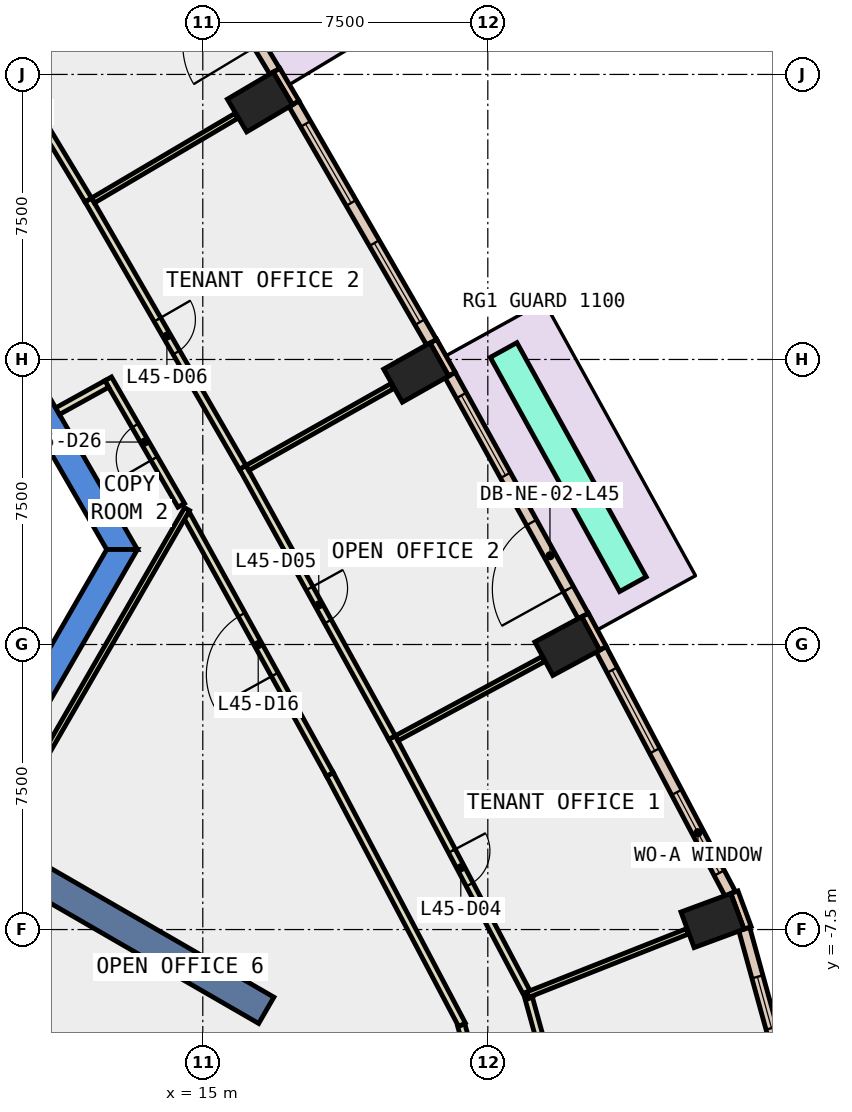
"""IFC4 building model, lengths in metres.
Left out: names, types, materials, properties, quantities, classifications, styles, units other than length and angle.
Written with IfcOpenShell. Run it as: python <this file> out.ifc"""

import sys

from ifc_helpers import new_model, si_unit, direction, frame, frame_2d, origin, origin_2d, place, context, subcontext, project, spatial, polyline, rectangle, outline, extrude, element, fill, save


model = new_model("IFC4")
c1 = context("Model", 3, precision=1e-05, world=origin(), true_north=direction((0.0, 1.0)))
c2 = subcontext(c1, "Body", "Model", "MODEL_VIEW")
j1 = project(units=[si_unit("LENGTHUNIT", "METRE"), si_unit("PLANEANGLEUNIT", "RADIAN")], contexts=[c1])
p1 = place(None, origin())
s1 = spatial("IfcSite", under=j1, at=p1, CompositionType="ELEMENT")
p2 = place(p1, origin())
s2 = spatial("IfcBuilding", under=s1, at=p2, CompositionType="ELEMENT")
p3 = place(p2, frame((0.0, 0.0, 202.4)))
s3 = spatial("IfcBuildingStorey", under=s2, at=p3, CompositionType="ELEMENT", Elevation=202.4)
for number, where, z_axis, x_axis in (
    (1, (28.412, -7.264, -0.4), (0.0, 0.0, 1.0), (-0.347, 0.938, 0.0)),
    (2, (24.591, -0.042, -0.4), (0.0, 0.0, 1.0), (-0.474, 0.88, 0.0)),
    (3, (20.615, 7.155, -0.4), (0.0, 0.0, 1.0), (-0.491, 0.871, 0.0)),
    (4, (16.504, 14.275, -0.4), (0.0, 0.0, 1.0), (-0.509, 0.861, 0.0)),
):
    element("IfcColumn", number, at=place(p3, frame(where, z_axis=z_axis, x_axis=x_axis)), inside=s3, PredefinedType="COLUMN", context=c2, shape_type="SweptSolid", body=[
        extrude(rectangle(XDim=1.0, YDim=1.4, at=origin_2d()), origin(), (0.0, 0.0, 1.0), 4.2),
    ])
p4 = place(p3, frame((0.0, 0.0, -0.4)))
e5 = element("IfcWall", 5, at=p4, inside=s3, PredefinedType="SHEAR", context=c2, shape_type="SweptSolid", body=[
    extrude(outline(polyline([(8.084, 11.498), (7.478, 11.148), (12.471, 2.5), (13.279, 2.5), (8.084, 11.498)])), origin(), (0.0, 0.0, 1.0), 4.2),
])
p5 = place(p3, frame((0.0, 0.0, -0.4)))
e6 = element("IfcWall", 6, at=p5, inside=s3, PredefinedType="SHEAR", context=c2, shape_type="SweptSolid", body=[
    extrude(outline(polyline([(6.64, -9.0), (13.279, 2.5), (12.471, 2.5), (6.235, -8.3), (6.64, -9.0)])), origin(), (0.0, 0.0, 1.0), 4.2),
])
p6 = place(p3, frame((8.877, -5.125, -0.4), z_axis=(0.0, 0.0, 1.0), x_axis=(0.866017533419, -0.500013631625, 0.0)))
e7 = element("IfcWall", 7, at=p6, inside=s3, PredefinedType="SHEAR", context=c2, shape_type="SweptSolid", body=[
    extrude(rectangle(XDim=9.0, YDim=0.8, at=frame_2d((4.5, 0.0))), origin(), (0.0, 0.0, 1.0), 4.2),
])
p7 = place(p3, frame((29.336, -7.456, 0.0), z_axis=(0.0, 0.0, 1.0), x_axis=(-0.346892928577, 0.937904737222, 0.0)))
e8 = element("IfcWall", 8, at=p7, inside=s3, PredefinedType="STANDARD", context=c2, shape_type="SweptSolid", body=[
    extrude(rectangle(XDim=1.0, YDim=0.2, at=frame_2d((0.5, 0.0))), origin(), (0.0, 0.0, 1.0), 3.8),
])
p8 = place(p3, frame((25.532, -0.103, 0.0), z_axis=(0.0, 0.0, 1.0), x_axis=(-0.473663196434, 0.88070606694, 0.0)))
e9 = element("IfcWall", 9, at=p8, inside=s3, PredefinedType="STANDARD", context=c2, shape_type="SweptSolid", body=[
    extrude(rectangle(XDim=1.0, YDim=0.2, at=frame_2d((0.5, 0.0))), origin(), (0.0, 0.0, 1.0), 3.8),
])
p9 = place(p3, frame((21.558, 7.112, 0.0), z_axis=(0.0, 0.0, 1.0), x_axis=(-0.492033129803, 0.870576475202, 0.0)))
e10 = element("IfcWall", 10, at=p9, inside=s3, PredefinedType="STANDARD", context=c2, shape_type="SweptSolid", body=[
    extrude(rectangle(XDim=1.0, YDim=0.2, at=frame_2d((0.5, 0.0))), origin(), (0.0, 0.0, 1.0), 3.8),
])
p10 = place(p3, frame((17.447, 14.252, 0.0), z_axis=(0.0, 0.0, 1.0), x_axis=(-0.508161541526, 0.861261776531, 0.0)))
e11 = element("IfcWall", 11, at=p10, inside=s3, PredefinedType="STANDARD", context=c2, shape_type="SweptSolid", body=[
    extrude(rectangle(XDim=1.0, YDim=0.2, at=frame_2d((0.5, 0.0))), origin(), (0.0, 0.0, 1.0), 3.8),
])
p11 = place(p3, frame((30.312, -11.35, 0.0), z_axis=(0.0, 0.0, 1.0), x_axis=(-0.265534577923, 0.96410133696, 0.0)))
e12 = element("IfcWall", 12, at=p11, inside=s3, PredefinedType="STANDARD", context=c2, shape_type="SweptSolid", body=[
    extrude(rectangle(XDim=4.007, YDim=0.3, at=frame_2d((2.003, 0.0))), origin(), (0.0, 0.0, 1.0), 3.8),
])
p12 = place(p11, frame((1.303, 0.0, 0.9)))
e13 = element("IfcOpeningElement", 13, at=p12, cuts=e12, PredefinedType="OPENING", context=c2, shape_type="SweptSolid", body=[
    extrude(rectangle(XDim=1.4, YDim=2.6, at=frame_2d((0.7, 1.3))), frame((0.0, 0.16, 0.0), z_axis=(0.0, -1.0, 0.0), x_axis=(1.0, 0.0, 0.0)), (0.0, 0.0, 1.0), 0.32),
])
p13 = place(p3, frame((28.879, -6.559, 0.0), z_axis=(0.0, 0.0, 1.0), x_axis=(-0.466789249342, 0.884368586449, 0.0)))
e14 = element("IfcWall", 14, at=p13, inside=s3, PredefinedType="STANDARD", context=c2, shape_type="SweptSolid", body=[
    extrude(rectangle(XDim=7.273, YDim=0.3, at=frame_2d((3.637, 0.0))), origin(), (0.0, 0.0, 1.0), 3.8),
])
p14 = place(p13, frame((0.618, 0.0, 0.9)))
e15 = element("IfcOpeningElement", 15, at=p14, cuts=e14, PredefinedType="OPENING", context=c2, shape_type="SweptSolid", body=[
    extrude(rectangle(XDim=2.4, YDim=2.6, at=frame_2d((1.2, 1.3))), frame((0.0, 0.16, 0.0), z_axis=(0.0, -1.0, 0.0), x_axis=(1.0, 0.0, 0.0)), (0.0, 0.0, 1.0), 0.32),
])
p15 = place(p13, frame((4.255, 0.0, 0.9)))
e16 = element("IfcOpeningElement", 16, at=p15, cuts=e14, PredefinedType="OPENING", context=c2, shape_type="SweptSolid", body=[
    extrude(rectangle(XDim=2.4, YDim=2.6, at=frame_2d((1.2, 1.3))), frame((0.0, 0.16, 0.0), z_axis=(0.0, -1.0, 0.0), x_axis=(1.0, 0.0, 0.0)), (0.0, 0.0, 1.0), 0.32),
])
p16 = place(p3, frame((25.01, 0.751, 0.0), z_axis=(0.0, 0.0, 1.0), x_axis=(-0.483590905878, 0.875294142419, 0.0)))
e17 = element("IfcWall", 17, at=p16, inside=s3, PredefinedType="STANDARD", context=c2, shape_type="SweptSolid", body=[
    extrude(rectangle(XDim=7.238, YDim=0.3, at=frame_2d((3.619, 0.0))), origin(), (0.0, 0.0, 1.0), 3.8),
])
p17 = place(p16, frame((0.809, 0.0, 0.0)))
e18 = element("IfcOpeningElement", 18, at=p17, cuts=e17, PredefinedType="OPENING", context=c2, shape_type="SweptSolid", body=[
    extrude(rectangle(XDim=2.0, YDim=2.4, at=frame_2d((1.0, 1.2))), frame((0.0, 0.16, 0.0), z_axis=(0.0, -1.0, 0.0), x_axis=(1.0, 0.0, 0.0)), (0.0, 0.0, 1.0), 0.32),
])
p18 = place(p16, frame((4.228, 0.0, 0.9)))
e19 = element("IfcOpeningElement", 19, at=p18, cuts=e17, PredefinedType="OPENING", context=c2, shape_type="SweptSolid", body=[
    extrude(rectangle(XDim=2.4, YDim=2.6, at=frame_2d((1.2, 1.3))), frame((0.0, 0.16, 0.0), z_axis=(0.0, -1.0, 0.0), x_axis=(1.0, 0.0, 0.0)), (0.0, 0.0, 1.0), 0.32),
])
p19 = place(p3, frame((21.019, 7.955, 0.0), z_axis=(0.0, 0.0, 1.0), x_axis=(-0.500012402131, 0.866018243292, 0.0)))
e20 = element("IfcWall", 20, at=p19, inside=s3, PredefinedType="STANDARD", context=c2, shape_type="SweptSolid", body=[
    extrude(rectangle(XDim=7.24, YDim=0.3, at=frame_2d((3.62, 0.0))), origin(), (0.0, 0.0, 1.0), 3.8),
])
p20 = place(p19, frame((0.61, 0.0, 0.9)))
e21 = element("IfcOpeningElement", 21, at=p20, cuts=e20, PredefinedType="OPENING", context=c2, shape_type="SweptSolid", body=[
    extrude(rectangle(XDim=2.4, YDim=2.6, at=frame_2d((1.2, 1.3))), frame((0.0, 0.16, 0.0), z_axis=(0.0, -1.0, 0.0), x_axis=(1.0, 0.0, 0.0)), (0.0, 0.0, 1.0), 0.32),
])
p21 = place(p19, frame((4.23, 0.0, 0.9)))
e22 = element("IfcOpeningElement", 22, at=p21, cuts=e20, PredefinedType="OPENING", context=c2, shape_type="SweptSolid", body=[
    extrude(rectangle(XDim=2.4, YDim=2.6, at=frame_2d((1.2, 1.3))), frame((0.0, 0.16, 0.0), z_axis=(0.0, -1.0, 0.0), x_axis=(1.0, 0.0, 0.0)), (0.0, 0.0, 1.0), 0.32),
])
p22 = place(p3, frame((16.892, 15.084, 0.0), z_axis=(0.0, 0.0, 1.0), x_axis=(-0.516230553484, 0.856449657394, 0.0)))
e23 = element("IfcWall", 23, at=p22, inside=s3, PredefinedType="STANDARD", context=c2, shape_type="SweptSolid", body=[
    extrude(rectangle(XDim=7.239, YDim=0.3, at=frame_2d((3.62, 0.0))), origin(), (0.0, 0.0, 1.0), 3.8),
])
p23 = place(p22, frame((0.81, 0.0, 0.0)))
e24 = element("IfcOpeningElement", 24, at=p23, cuts=e23, PredefinedType="OPENING", context=c2, shape_type="SweptSolid", body=[
    extrude(rectangle(XDim=2.0, YDim=2.4, at=frame_2d((1.0, 1.2))), frame((0.0, 0.16, 0.0), z_axis=(0.0, -1.0, 0.0), x_axis=(1.0, 0.0, 0.0)), (0.0, 0.0, 1.0), 0.32),
])
p24 = place(p22, frame((4.229, 0.0, 0.9)))
e25 = element("IfcOpeningElement", 25, at=p24, cuts=e23, PredefinedType="OPENING", context=c2, shape_type="SweptSolid", body=[
    extrude(rectangle(XDim=2.4, YDim=2.6, at=frame_2d((1.2, 1.3))), frame((0.0, 0.16, 0.0), z_axis=(0.0, -1.0, 0.0), x_axis=(1.0, 0.0, 0.0)), (0.0, 0.0, 1.0), 0.32),
])
p25 = place(p3, frame((26.318, 1.587, 0.0), z_axis=(0.0, 0.0, 1.0), x_axis=(-0.483435790988, 0.875379823843, 0.0)))
e26 = element("IfcWall", 26, at=p25, inside=s3, PredefinedType="STANDARD", context=c2, shape_type="SweptSolid", body=[
    extrude(rectangle(XDim=7.039, YDim=0.8, at=frame_2d((3.52, 0.0))), origin(), (0.0, 0.0, 1.0), 0.8),
])
p26 = place(p3, frame((14.433, 3.663, 0.0), z_axis=(0.0, 0.0, 1.0), x_axis=(-0.500149526678, 0.865939057303, 0.0)))
e27 = element("IfcWall", 27, at=p26, inside=s3, PredefinedType="PARTITIONING", context=c2, shape_type="SweptSolid", body=[
    extrude(rectangle(XDim=3.843, YDim=0.2, at=frame_2d((1.921, 0.0))), origin(), (0.0, 0.0, 1.0), 3.8),
])
p27 = place(p26, frame((1.422, 0.0, 0.0)))
e28 = element("IfcOpeningElement", 28, at=p27, cuts=e27, PredefinedType="OPENING", context=c2, shape_type="SweptSolid", body=[
    extrude(rectangle(XDim=1.0, YDim=2.1, at=frame_2d((0.5, 1.05))), frame((0.0, 0.11, 0.0), z_axis=(0.0, -1.0, 0.0), x_axis=(1.0, 0.0, 0.0)), (0.0, 0.0, 1.0), 0.22),
])
p28 = place(p3, frame((12.474, 6.856, 0.0), z_axis=(0.0, 0.0, 1.0), x_axis=(-0.875305814696, -0.483569778584, 0.0)))
e29 = element("IfcWall", 29, at=p28, inside=s3, PredefinedType="PARTITIONING", context=c2, shape_type="SweptSolid", body=[
    extrude(rectangle(XDim=1.481, YDim=0.2, at=frame_2d((0.74, 0.0))), origin(), (0.0, 0.0, 1.0), 3.8),
])
p29 = place(p3, frame((22.35, -12.006, 0.0), z_axis=(0.0, 0.0, 1.0), x_axis=(-0.265584627827, 0.964087550725, 0.0)))
e30 = element("IfcWall", 30, at=p29, inside=s3, PredefinedType="PARTITIONING", context=c2, shape_type="SweptSolid", body=[
    extrude(rectangle(XDim=2.067, YDim=0.2, at=frame_2d((1.034, 0.0))), origin(), (0.0, 0.0, 1.0), 3.8),
])
p30 = place(p3, frame((21.821, -10.005, 0.0), z_axis=(0.0, 0.0, 1.0), x_axis=(-0.466770012358, 0.884378739887, 0.0)))
e31 = element("IfcWall", 31, at=p30, inside=s3, PredefinedType="PARTITIONING", context=c2, shape_type="SweptSolid", body=[
    extrude(rectangle(XDim=7.449, YDim=0.2, at=frame_2d((3.725, 0.0))), origin(), (0.0, 0.0, 1.0), 3.8),
])
p31 = place(p3, frame((18.344, -3.417, 0.0), z_axis=(0.0, 0.0, 1.0), x_axis=(-0.483555501116, 0.875313702247, 0.0)))
e32 = element("IfcWall", 32, at=p31, inside=s3, PredefinedType="PARTITIONING", context=c2, shape_type="SweptSolid", body=[
    extrude(rectangle(XDim=7.801, YDim=0.2, at=frame_2d((3.9, 0.0))), origin(), (0.0, 0.0, 1.0), 3.8),
])
p32 = place(p31, frame((3.0, 0.0, 0.0)))
e33 = element("IfcOpeningElement", 33, at=p32, cuts=e32, PredefinedType="OPENING", context=c2, shape_type="SweptSolid", body=[
    extrude(rectangle(XDim=1.8, YDim=2.1, at=frame_2d((0.9, 1.05))), frame((0.0, 0.11, 0.0), z_axis=(0.0, -1.0, 0.0), x_axis=(1.0, 0.0, 0.0)), (0.0, 0.0, 1.0), 0.22),
])
p33 = place(p3, frame((23.578, -9.309, 0.0), z_axis=(0.0, 0.0, 1.0), x_axis=(0.265884037198, -0.964005020092, 0.0)))
e34 = element("IfcWall", 34, at=p33, inside=s3, PredefinedType="PARTITIONING", context=c2, shape_type="SweptSolid", body=[
    extrude(rectangle(XDim=2.784, YDim=0.2, at=frame_2d((1.392, 0.0))), origin(), (0.0, 0.0, 1.0), 3.8),
])
p34 = place(p3, frame((19.98, -2.448, 0.0), z_axis=(0.0, 0.0, 1.0), x_axis=(0.466864023915, -0.884329114738, 0.0)))
e35 = element("IfcWall", 35, at=p34, inside=s3, PredefinedType="PARTITIONING", context=c2, shape_type="SweptSolid", body=[
    extrude(rectangle(XDim=7.75, YDim=0.2, at=frame_2d((3.875, 0.0))), origin(), (0.0, 0.0, 1.0), 3.8),
])
p35 = place(p34, frame((3.375, 0.0, 0.0)))
e36 = element("IfcOpeningElement", 36, at=p35, cuts=e35, PredefinedType="OPENING", context=c2, shape_type="SweptSolid", body=[
    extrude(rectangle(XDim=1.0, YDim=2.1, at=frame_2d((0.5, 1.05))), frame((0.0, 0.11, 0.0), z_axis=(0.0, -1.0, 0.0), x_axis=(1.0, 0.0, 0.0)), (0.0, 0.0, 1.0), 0.22),
])
p36 = place(p3, frame((16.051, 4.663, 0.0), z_axis=(0.0, 0.0, 1.0), x_axis=(0.483513440344, -0.875336936846, 0.0)))
e37 = element("IfcWall", 37, at=p36, inside=s3, PredefinedType="PARTITIONING", context=c2, shape_type="SweptSolid", body=[
    extrude(rectangle(XDim=8.124, YDim=0.2, at=frame_2d((4.062, 0.0))), origin(), (0.0, 0.0, 1.0), 3.8),
])
p37 = place(p36, frame((3.637, 0.0, 0.0)))
e38 = element("IfcOpeningElement", 38, at=p37, cuts=e37, PredefinedType="OPENING", context=c2, shape_type="SweptSolid", body=[
    extrude(rectangle(XDim=1.0, YDim=2.1, at=frame_2d((0.5, 1.05))), frame((0.0, 0.11, 0.0), z_axis=(0.0, -1.0, 0.0), x_axis=(1.0, 0.0, 0.0)), (0.0, 0.0, 1.0), 0.22),
])
p38 = place(p3, frame((11.987, 11.698, 0.0), z_axis=(0.0, 0.0, 1.0), x_axis=(0.500075329254, -0.865981908051, 0.0)))
e39 = element("IfcWall", 39, at=p38, inside=s3, PredefinedType="PARTITIONING", context=c2, shape_type="SweptSolid", body=[
    extrude(rectangle(XDim=8.125, YDim=0.2, at=frame_2d((4.062, 0.0))), origin(), (0.0, 0.0, 1.0), 3.8),
])
p39 = place(p38, frame((3.637, 0.0, 0.0)))
e40 = element("IfcOpeningElement", 40, at=p39, cuts=e39, PredefinedType="OPENING", context=c2, shape_type="SweptSolid", body=[
    extrude(rectangle(XDim=1.0, YDim=2.1, at=frame_2d((0.5, 1.05))), frame((0.0, 0.11, 0.0), z_axis=(0.0, -1.0, 0.0), x_axis=(1.0, 0.0, 0.0)), (0.0, 0.0, 1.0), 0.22),
])
p40 = place(p3, frame((7.792, 18.655, 0.0), z_axis=(0.0, 0.0, 1.0), x_axis=(0.516293428925, -0.856411755669, 0.0)))
e41 = element("IfcWall", 41, at=p40, inside=s3, PredefinedType="PARTITIONING", context=c2, shape_type="SweptSolid", body=[
    extrude(rectangle(XDim=8.124, YDim=0.2, at=frame_2d((4.062, 0.0))), origin(), (0.0, 0.0, 1.0), 3.8),
])
p41 = place(p40, frame((3.637, 0.0, 0.0)))
e42 = element("IfcOpeningElement", 42, at=p41, cuts=e41, PredefinedType="OPENING", context=c2, shape_type="SweptSolid", body=[
    extrude(rectangle(XDim=1.0, YDim=2.1, at=frame_2d((0.5, 1.05))), frame((0.0, 0.11, 0.0), z_axis=(0.0, -1.0, 0.0), x_axis=(1.0, 0.0, 0.0)), (0.0, 0.0, 1.0), 0.22),
])
p42 = place(p3, frame((23.552, -9.212, 0.0), z_axis=(0.0, 0.0, 1.0), x_axis=(0.929720624715, 0.368265610639, 0.0)))
e43 = element("IfcWall", 43, at=p42, inside=s3, PredefinedType="PARTITIONING", context=c2, shape_type="SweptSolid", body=[
    extrude(rectangle(XDim=4.515, YDim=0.15, at=frame_2d((2.258, 0.0))), origin(), (0.0, 0.0, 1.0), 3.8),
])
p43 = place(p3, frame((20.103, -2.466, 0.0), z_axis=(0.0, 0.0, 1.0), x_axis=(0.879965969606, 0.475036727354, 0.0)))
e44 = element("IfcWall", 44, at=p43, inside=s3, PredefinedType="PARTITIONING", context=c2, shape_type="SweptSolid", body=[
    extrude(rectangle(XDim=4.381, YDim=0.15, at=frame_2d((2.19, 0.0))), origin(), (0.0, 0.0, 1.0), 3.8),
])
p44 = place(p3, frame((16.174, 4.646, 0.0), z_axis=(0.0, 0.0, 1.0), x_axis=(0.870725770229, 0.491768881752, 0.0)))
e45 = element("IfcWall", 45, at=p44, inside=s3, PredefinedType="PARTITIONING", context=c2, shape_type="SweptSolid", body=[
    extrude(rectangle(XDim=4.38, YDim=0.15, at=frame_2d((2.19, 0.0))), origin(), (0.0, 0.0, 1.0), 3.8),
])
p45 = place(p3, frame((12.111, 11.684, 0.0), z_axis=(0.0, 0.0, 1.0), x_axis=(0.861290233547, 0.508113307833, 0.0)))
e46 = element("IfcWall", 46, at=p45, inside=s3, PredefinedType="PARTITIONING", context=c2, shape_type="SweptSolid", body=[
    extrude(rectangle(XDim=4.381, YDim=0.15, at=frame_2d((2.19, 0.0))), origin(), (0.0, 0.0, 1.0), 3.8),
])
p46 = place(p3, frame((9.597, -5.079, 0.0), z_axis=(0.0, 0.0, 1.0), x_axis=(0.499962477963, 0.866047066059, 0.0)))
e47 = element("IfcWall", 47, at=p46, inside=s3, PredefinedType="PARTITIONING", context=c2, shape_type="SweptSolid", body=[
    extrude(rectangle(XDim=9.979, YDim=0.15, at=frame_2d((4.989, 0.0))), origin(), (0.0, 0.0, 1.0), 3.8),
])
p47 = place(p12, origin())
e48 = element("IfcWindow", 48, at=p47, inside=s3, PartitioningType="SINGLE_PANEL", PredefinedType="WINDOW", context=c2, shape_type="SweptSolid", body=[
    extrude(rectangle(XDim=1.4, YDim=2.6, at=frame_2d((0.7, 1.3))), frame((0.0, 0.03, 0.0), z_axis=(0.0, -1.0, 0.0), x_axis=(1.0, 0.0, 0.0)), (0.0, 0.0, 1.0), 0.06),
])
fill(e13, e48)
p48 = place(p14, origin())
e49 = element("IfcWindow", 49, at=p48, inside=s3, PartitioningType="SINGLE_PANEL", PredefinedType="WINDOW", context=c2, shape_type="SweptSolid", body=[
    extrude(rectangle(XDim=2.4, YDim=2.6, at=frame_2d((1.2, 1.3))), frame((0.0, 0.03, 0.0), z_axis=(0.0, -1.0, 0.0), x_axis=(1.0, 0.0, 0.0)), (0.0, 0.0, 1.0), 0.06),
])
fill(e15, e49)
p49 = place(p15, origin())
e50 = element("IfcWindow", 50, at=p49, inside=s3, PartitioningType="SINGLE_PANEL", PredefinedType="WINDOW", context=c2, shape_type="SweptSolid", body=[
    extrude(rectangle(XDim=2.4, YDim=2.6, at=frame_2d((1.2, 1.3))), frame((0.0, 0.03, 0.0), z_axis=(0.0, -1.0, 0.0), x_axis=(1.0, 0.0, 0.0)), (0.0, 0.0, 1.0), 0.06),
])
fill(e16, e50)
p50 = place(p17, origin())
e51 = element("IfcDoor", 51, at=p50, inside=s3, OperationType="SLIDING_TO_LEFT", PredefinedType="DOOR", context=c2, shape_type="SweptSolid", body=[
    extrude(rectangle(XDim=2.0, YDim=2.4, at=frame_2d((1.0, 1.2))), frame((0.0, 0.025, 0.0), z_axis=(0.0, -1.0, 0.0), x_axis=(1.0, 0.0, 0.0)), (0.0, 0.0, 1.0), 0.05),
])
fill(e18, e51)
p51 = place(p18, origin())
e52 = element("IfcWindow", 52, at=p51, inside=s3, PartitioningType="SINGLE_PANEL", PredefinedType="WINDOW", context=c2, shape_type="SweptSolid", body=[
    extrude(rectangle(XDim=2.4, YDim=2.6, at=frame_2d((1.2, 1.3))), frame((0.0, 0.03, 0.0), z_axis=(0.0, -1.0, 0.0), x_axis=(1.0, 0.0, 0.0)), (0.0, 0.0, 1.0), 0.06),
])
fill(e19, e52)
p52 = place(p20, origin())
e53 = element("IfcWindow", 53, at=p52, inside=s3, PartitioningType="SINGLE_PANEL", PredefinedType="WINDOW", context=c2, shape_type="SweptSolid", body=[
    extrude(rectangle(XDim=2.4, YDim=2.6, at=frame_2d((1.2, 1.3))), frame((0.0, 0.03, 0.0), z_axis=(0.0, -1.0, 0.0), x_axis=(1.0, 0.0, 0.0)), (0.0, 0.0, 1.0), 0.06),
])
fill(e21, e53)
p53 = place(p21, origin())
e54 = element("IfcWindow", 54, at=p53, inside=s3, PartitioningType="SINGLE_PANEL", PredefinedType="WINDOW", context=c2, shape_type="SweptSolid", body=[
    extrude(rectangle(XDim=2.4, YDim=2.6, at=frame_2d((1.2, 1.3))), frame((0.0, 0.03, 0.0), z_axis=(0.0, -1.0, 0.0), x_axis=(1.0, 0.0, 0.0)), (0.0, 0.0, 1.0), 0.06),
])
fill(e22, e54)
p54 = place(p35, origin())
e55 = element("IfcDoor", 55, at=p54, inside=s3, OperationType="SINGLE_SWING_LEFT", PredefinedType="DOOR", context=c2, shape_type="SweptSolid", body=[
    extrude(rectangle(XDim=1.0, YDim=2.1, at=frame_2d((0.5, 1.05))), frame((0.0, 0.025, 0.0), z_axis=(0.0, -1.0, 0.0), x_axis=(1.0, 0.0, 0.0)), (0.0, 0.0, 1.0), 0.05),
])
fill(e36, e55)
p55 = place(p37, origin())
e56 = element("IfcDoor", 56, at=p55, inside=s3, OperationType="SINGLE_SWING_RIGHT", PredefinedType="DOOR", context=c2, shape_type="SweptSolid", body=[
    extrude(rectangle(XDim=1.0, YDim=2.1, at=frame_2d((0.5, 1.05))), frame((0.0, 0.025, 0.0), z_axis=(0.0, -1.0, 0.0), x_axis=(1.0, 0.0, 0.0)), (0.0, 0.0, 1.0), 0.05),
])
fill(e38, e56)
p56 = place(p39, origin())
e57 = element("IfcDoor", 57, at=p56, inside=s3, OperationType="SINGLE_SWING_RIGHT", PredefinedType="DOOR", context=c2, shape_type="SweptSolid", body=[
    extrude(rectangle(XDim=1.0, YDim=2.1, at=frame_2d((0.5, 1.05))), frame((0.0, 0.025, 0.0), z_axis=(0.0, -1.0, 0.0), x_axis=(1.0, 0.0, 0.0)), (0.0, 0.0, 1.0), 0.05),
])
fill(e40, e57)
p57 = place(p32, origin())
e58 = element("IfcDoor", 58, at=p57, inside=s3, OperationType="DOUBLE_DOOR_SINGLE_SWING", PredefinedType="DOOR", context=c2, shape_type="SweptSolid", body=[
    extrude(rectangle(XDim=1.8, YDim=2.1, at=frame_2d((0.9, 1.05))), frame((0.0, 0.025, 0.0), z_axis=(0.0, -1.0, 0.0), x_axis=(1.0, 0.0, 0.0)), (0.0, 0.0, 1.0), 0.05),
])
fill(e33, e58)
p58 = place(p27, origin())
e59 = element("IfcDoor", 59, at=p58, inside=s3, OperationType="SINGLE_SWING_RIGHT", PredefinedType="DOOR", context=c2, shape_type="SweptSolid", body=[
    extrude(rectangle(XDim=1.0, YDim=2.1, at=frame_2d((0.5, 1.05))), frame((0.0, 0.025, 0.0), z_axis=(0.0, -1.0, 0.0), x_axis=(1.0, 0.0, 0.0)), (0.0, 0.0, 1.0), 0.05),
])
fill(e28, e59)
save(model, sys.argv[1])
